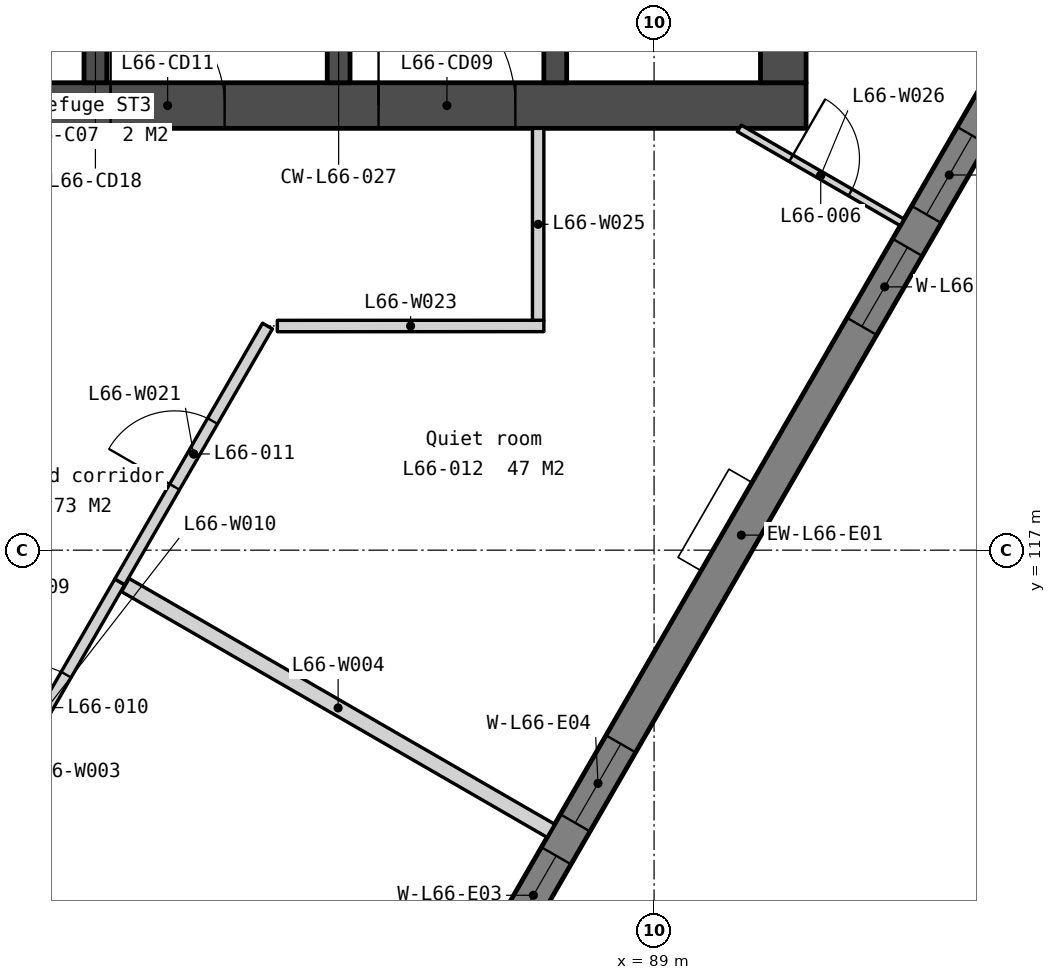
"""IFC4 building model, lengths in metres.
Left out: names, types, materials, properties, quantities, classifications, styles, units other than length and angle.
Written with IfcOpenShell. Run it as: python <this file> out.ifc"""

import sys

from ifc_helpers import new_model, si_unit, direction, frame, frame_2d, origin, place, context, subcontext, project, spatial, polyline, rectangle, outline, extrude, element, fill, save


model = new_model("IFC4")
c1 = context("Model", 3, precision=1e-05, world=origin(), true_north=direction((0.0, 1.0)))
c2 = subcontext(c1, "Body", "Model", "MODEL_VIEW")
j1 = project(units=[si_unit("LENGTHUNIT", "METRE"), si_unit("PLANEANGLEUNIT", "RADIAN")], contexts=[c1])
p1 = place(None, origin())
s1 = spatial("IfcSite", under=j1, at=p1, CompositionType="ELEMENT")
p2 = place(p1, origin())
s2 = spatial("IfcBuilding", under=s1, at=p2, CompositionType="ELEMENT")
p3 = place(p2, frame((0.0, 0.0, 269.9)))
s3 = spatial("IfcBuildingStorey", under=s2, at=p3, CompositionType="ELEMENT", Elevation=269.9)
p4 = place(p3, frame((69.0, 122.85, 0.0), z_axis=(0.0, 0.0, 1.0), x_axis=(1.0, 0.0, 0.0)))
e1 = element("IfcWall", 1, at=p4, inside=s3, PredefinedType="SOLIDWALL", context=c2, shape_type="SweptSolid", body=[
    extrude(rectangle(XDim=22.0, YDim=0.6, at=frame_2d((11.0, 0.0))), origin(), (0.0, 0.0, 1.0), 3.75),
])
p5 = place(p4, frame((16.375, 0.0, 0.0)))
e2 = element("IfcOpeningElement", 2, at=p5, cuts=e1, PredefinedType="OPENING", context=c2, shape_type="SweptSolid", body=[
    extrude(rectangle(XDim=1.8, YDim=2.1, at=frame_2d((0.9, 1.05))), frame((0.0, 0.31, 0.0), z_axis=(0.0, -1.0, 0.0), x_axis=(1.0, 0.0, 0.0)), (0.0, 0.0, 1.0), 0.62),
])
p6 = place(p4, frame((3.825, 0.0, 0.0)))
e3 = element("IfcOpeningElement", 3, at=p6, cuts=e1, PredefinedType="OPENING", context=c2, shape_type="SweptSolid", body=[
    extrude(rectangle(XDim=1.8, YDim=2.1, at=frame_2d((0.9, 1.05))), frame((0.0, 0.31, 0.0), z_axis=(0.0, -1.0, 0.0), x_axis=(1.0, 0.0, 0.0)), (0.0, 0.0, 1.0), 0.62),
])
p7 = place(p4, frame((12.85, 0.0, 0.0)))
e4 = element("IfcOpeningElement", 4, at=p7, cuts=e1, PredefinedType="OPENING", context=c2, shape_type="SweptSolid", body=[
    extrude(rectangle(XDim=1.5, YDim=2.1, at=frame_2d((0.75, 1.05))), frame((0.0, 0.31, 0.0), z_axis=(0.0, -1.0, 0.0), x_axis=(1.0, 0.0, 0.0)), (0.0, 0.0, 1.0), 0.62),
])
p8 = place(p3, frame((81.65, 125.7, 0.0), z_axis=(0.0, 0.0, 1.0), x_axis=(0.0, -1.0, 0.0)))
e5 = element("IfcWall", 5, at=p8, inside=s3, PredefinedType="SOLIDWALL", context=c2, shape_type="SweptSolid", body=[
    extrude(rectangle(XDim=2.55, YDim=0.3, at=frame_2d((1.275, 0.0))), origin(), (0.0, 0.0, 1.0), 3.75),
])
p9 = place(p8, frame((0.75, 0.0, 0.0)))
e6 = element("IfcOpeningElement", 6, at=p9, cuts=e5, PredefinedType="OPENING", context=c2, shape_type="SweptSolid", body=[
    extrude(rectangle(XDim=1.0, YDim=2.1, at=frame_2d((0.5, 1.05))), frame((0.0, 0.16, 0.0), z_axis=(0.0, -1.0, 0.0), x_axis=(1.0, 0.0, 0.0)), (0.0, 0.0, 1.0), 0.32),
])
p10 = place(p3, frame((84.85, 125.85, 0.0), z_axis=(0.0, 0.0, 1.0), x_axis=(0.0, -1.0, 0.0)))
e7 = element("IfcWall", 7, at=p10, inside=s3, PredefinedType="SOLIDWALL", context=c2, shape_type="SweptSolid", body=[
    extrude(rectangle(XDim=2.7, YDim=0.3, at=frame_2d((1.35, 0.0))), origin(), (0.0, 0.0, 1.0), 3.75),
])
p11 = place(p3, frame((87.7, 133.95, 0.0), z_axis=(0.0, 0.0, 1.0), x_axis=(0.0, -1.0, 0.0)))
e8 = element("IfcWall", 8, at=p11, inside=s3, PredefinedType="SOLIDWALL", context=c2, shape_type="SweptSolid", body=[
    extrude(rectangle(XDim=10.8, YDim=0.3, at=frame_2d((5.4, 0.0))), origin(), (0.0, 0.0, 1.0), 3.75),
])
p12 = place(p11, frame((6.95, 0.0, 0.0)))
e9 = element("IfcOpeningElement", 9, at=p12, cuts=e8, PredefinedType="OPENING", context=c2, shape_type="SweptSolid", body=[
    extrude(rectangle(XDim=1.1, YDim=2.1, at=frame_2d((0.55, 1.05))), frame((0.0, 0.16, 0.0), z_axis=(0.0, -1.0, 0.0), x_axis=(1.0, 0.0, 0.0)), (0.0, 0.0, 1.0), 0.32),
])
p13 = place(p11, frame((5.1, 0.0, 0.0)))
e10 = element("IfcOpeningElement", 10, at=p13, cuts=e8, PredefinedType="OPENING", context=c2, shape_type="SweptSolid", body=[
    extrude(rectangle(XDim=1.0, YDim=2.1, at=frame_2d((0.5, 1.05))), frame((0.0, 0.16, 0.0), z_axis=(0.0, -1.0, 0.0), x_axis=(1.0, 0.0, 0.0)), (0.0, 0.0, 1.0), 0.32),
])
p14 = place(p11, frame((9.25, 0.0, 0.0)))
e11 = element("IfcOpeningElement", 11, at=p14, cuts=e8, PredefinedType="OPENING", context=c2, shape_type="SweptSolid", body=[
    extrude(rectangle(XDim=1.1, YDim=2.1, at=frame_2d((0.55, 1.05))), frame((0.0, 0.16, 0.0), z_axis=(0.0, -1.0, 0.0), x_axis=(1.0, 0.0, 0.0)), (0.0, 0.0, 1.0), 0.32),
])
p15 = place(p3, frame((90.7, 133.95, 0.0), z_axis=(0.0, 0.0, 1.0), x_axis=(0.0, -1.0, 0.0)))
e12 = element("IfcWall", 12, at=p15, inside=s3, PredefinedType="SOLIDWALL", context=c2, shape_type="SweptSolid", body=[
    extrude(rectangle(XDim=10.8, YDim=0.6, at=frame_2d((5.4, 0.0))), origin(), (0.0, 0.0, 1.0), 3.75),
])
p16 = place(p3, frame((80.905, 101.188, -0.15), z_axis=(0.0, 0.0, 1.0), x_axis=(0.500002536638, 0.866023939251, 0.0)))
e13 = element("IfcWall", 13, at=p16, inside=s3, PredefinedType="SOLIDWALL", context=c2, shape_type="SweptSolid", body=[
    extrude(outline(polyline([(36.972, 0.0), (36.972, 3.9), (0.0, 3.9), (0.0, 0.0), (36.972, 0.0)])), frame((0.0, 0.225, 0.0), z_axis=(0.0, -1.0, 0.0), x_axis=(1.0, 0.0, 0.0)), (0.0, 0.0, 1.0), 0.45),
])
p17 = place(p16, frame((3.172, 0.0, 0.95)))
e14 = element("IfcOpeningElement", 14, at=p17, cuts=e13, PredefinedType="OPENING", context=c2, shape_type="SweptSolid", body=[
    extrude(rectangle(XDim=1.2, YDim=2.2, at=frame_2d((0.6, 1.1))), frame((0.0, 0.235, 0.0), z_axis=(0.0, -1.0, 0.0), x_axis=(1.0, 0.0, 0.0)), (0.0, 0.0, 1.0), 0.47),
])
p18 = place(p16, frame((4.872, 0.0, 0.95)))
e15 = element("IfcOpeningElement", 15, at=p18, cuts=e13, PredefinedType="OPENING", context=c2, shape_type="SweptSolid", body=[
    extrude(rectangle(XDim=1.2, YDim=2.2, at=frame_2d((0.6, 1.1))), frame((0.0, 0.235, 0.0), z_axis=(0.0, -1.0, 0.0), x_axis=(1.0, 0.0, 0.0)), (0.0, 0.0, 1.0), 0.47),
])
p19 = place(p16, frame((12.415, 0.0, 0.95)))
e16 = element("IfcOpeningElement", 16, at=p19, cuts=e13, PredefinedType="OPENING", context=c2, shape_type="SweptSolid", body=[
    extrude(rectangle(XDim=1.2, YDim=2.2, at=frame_2d((0.6, 1.1))), frame((0.0, 0.235, 0.0), z_axis=(0.0, -1.0, 0.0), x_axis=(1.0, 0.0, 0.0)), (0.0, 0.0, 1.0), 0.47),
])
p20 = place(p16, frame((14.115, 0.0, 0.95)))
e17 = element("IfcOpeningElement", 17, at=p20, cuts=e13, PredefinedType="OPENING", context=c2, shape_type="SweptSolid", body=[
    extrude(rectangle(XDim=1.2, YDim=2.2, at=frame_2d((0.6, 1.1))), frame((0.0, 0.235, 0.0), z_axis=(0.0, -1.0, 0.0), x_axis=(1.0, 0.0, 0.0)), (0.0, 0.0, 1.0), 0.47),
])
p21 = place(p16, frame((21.658, 0.0, 0.95)))
e18 = element("IfcOpeningElement", 18, at=p21, cuts=e13, PredefinedType="OPENING", context=c2, shape_type="SweptSolid", body=[
    extrude(rectangle(XDim=1.2, YDim=2.2, at=frame_2d((0.6, 1.1))), frame((0.0, 0.235, 0.0), z_axis=(0.0, -1.0, 0.0), x_axis=(1.0, 0.0, 0.0)), (0.0, 0.0, 1.0), 0.47),
])
p22 = place(p16, frame((23.358, 0.0, 0.95)))
e19 = element("IfcOpeningElement", 19, at=p22, cuts=e13, PredefinedType="OPENING", context=c2, shape_type="SweptSolid", body=[
    extrude(rectangle(XDim=1.2, YDim=2.2, at=frame_2d((0.6, 1.1))), frame((0.0, 0.235, 0.0), z_axis=(0.0, -1.0, 0.0), x_axis=(1.0, 0.0, 0.0)), (0.0, 0.0, 1.0), 0.47),
])
p23 = place(p16, frame((30.901, 0.0, 0.95)))
e20 = element("IfcOpeningElement", 20, at=p23, cuts=e13, PredefinedType="OPENING", context=c2, shape_type="SweptSolid", body=[
    extrude(rectangle(XDim=1.2, YDim=2.2, at=frame_2d((0.6, 1.1))), frame((0.0, 0.235, 0.0), z_axis=(0.0, -1.0, 0.0), x_axis=(1.0, 0.0, 0.0)), (0.0, 0.0, 1.0), 0.47),
])
p24 = place(p16, frame((32.601, 0.0, 0.95)))
e21 = element("IfcOpeningElement", 21, at=p24, cuts=e13, PredefinedType="OPENING", context=c2, shape_type="SweptSolid", body=[
    extrude(rectangle(XDim=1.2, YDim=2.2, at=frame_2d((0.6, 1.1))), frame((0.0, 0.235, 0.0), z_axis=(0.0, -1.0, 0.0), x_axis=(1.0, 0.0, 0.0)), (0.0, 0.0, 1.0), 0.47),
])
p25 = place(p3, frame((82.044, 116.54, 0.0), z_axis=(0.0, 0.0, 1.0), x_axis=(0.86603151488, -0.499989415123, 0.0)))
e22 = element("IfcWall", 22, at=p25, inside=s3, PredefinedType="PARTITIONING", context=c2, shape_type="SweptSolid", body=[
    extrude(rectangle(XDim=6.465, YDim=0.2, at=frame_2d((3.232, 0.0))), origin(), (0.0, 0.0, 1.0), 3.75),
])
p26 = place(p3, frame((80.06, 113.274, 0.0), z_axis=(0.0, 0.0, 1.0), x_axis=(0.499987977232, 0.866032345022, 0.0)))
e23 = element("IfcWall", 23, at=p26, inside=s3, PredefinedType="PARTITIONING", context=c2, shape_type="SweptSolid", body=[
    extrude(rectangle(XDim=3.82, YDim=0.15, at=frame_2d((1.91, 0.0))), origin(), (0.0, 0.0, 1.0), 3.75),
])
p27 = place(p26, frame((1.41, 0.0, 0.0)))
e24 = element("IfcOpeningElement", 24, at=p27, cuts=e23, PredefinedType="OPENING", context=c2, shape_type="SweptSolid", body=[
    extrude(rectangle(XDim=1.0, YDim=2.1, at=frame_2d((0.5, 1.05))), frame((0.0, 0.085, 0.0), z_axis=(0.0, -1.0, 0.0), x_axis=(1.0, 0.0, 0.0)), (0.0, 0.0, 1.0), 0.17),
])
p28 = place(p3, frame((81.97, 116.583, 0.0), z_axis=(0.0, 0.0, 1.0), x_axis=(0.500003384379, 0.866023449803, 0.0)))
e25 = element("IfcWall", 25, at=p28, inside=s3, PredefinedType="PARTITIONING", context=c2, shape_type="SweptSolid", body=[
    extrude(rectangle(XDim=3.887, YDim=0.15, at=frame_2d((1.943, 0.0))), origin(), (0.0, 0.0, 1.0), 3.75),
])
p29 = place(p28, frame((1.443, 0.0, 0.0)))
e26 = element("IfcOpeningElement", 26, at=p29, cuts=e25, PredefinedType="OPENING", context=c2, shape_type="SweptSolid", body=[
    extrude(rectangle(XDim=1.0, YDim=2.1, at=frame_2d((0.5, 1.05))), frame((0.0, 0.085, 0.0), z_axis=(0.0, -1.0, 0.0), x_axis=(1.0, 0.0, 0.0)), (0.0, 0.0, 1.0), 0.17),
])
p30 = place(p3, frame((84.043, 119.949, 0.0), z_axis=(0.0, 0.0, 1.0), x_axis=(0.999999961215, 0.000278512731, 0.0)))
e27 = element("IfcWall", 27, at=p30, inside=s3, PredefinedType="PARTITIONING", context=c2, shape_type="SweptSolid", body=[
    extrude(rectangle(XDim=3.506, YDim=0.15, at=frame_2d((1.753, 0.0))), origin(), (0.0, 0.0, 1.0), 3.75),
])
p31 = place(p3, frame((87.475, 120.025, 0.0), z_axis=(0.0, 0.0, 1.0), x_axis=(9.6693096e-05, 0.999999995325, 0.0)))
e28 = element("IfcWall", 28, at=p31, inside=s3, PredefinedType="PARTITIONING", context=c2, shape_type="SweptSolid", body=[
    extrude(rectangle(XDim=2.525, YDim=0.15, at=frame_2d((1.262, 0.0))), origin(), (0.0, 0.0, 1.0), 3.75),
])
p32 = place(p3, frame((90.121, 122.55, 0.0), z_axis=(0.0, 0.0, 1.0), x_axis=(0.86604923931, -0.499958713387, 0.0)))
e29 = element("IfcWall", 29, at=p32, inside=s3, PredefinedType="PARTITIONING", context=c2, shape_type="SweptSolid", body=[
    extrude(rectangle(XDim=2.475, YDim=0.1, at=frame_2d((1.237, 0.0))), origin(), (0.0, 0.0, 1.0), 3.75),
])
p33 = place(p32, frame((0.787, 0.0, 0.0)))
e30 = element("IfcOpeningElement", 30, at=p33, cuts=e29, PredefinedType="OPENING", context=c2, shape_type="SweptSolid", body=[
    extrude(rectangle(XDim=0.9, YDim=2.1, at=frame_2d((0.45, 1.05))), frame((0.0, 0.06, 0.0), z_axis=(0.0, -1.0, 0.0), x_axis=(1.0, 0.0, 0.0)), (0.0, 0.0, 1.0), 0.12),
])
p34 = place(p5, origin())
e31 = element("IfcDoor", 31, at=p34, inside=s3, OperationType="DOUBLE_DOOR_DOUBLE_SWING", PredefinedType="DOOR", context=c2, shape_type="SweptSolid", body=[
    extrude(rectangle(XDim=1.8, YDim=2.1, at=frame_2d((0.9, 1.05))), frame((0.0, 0.025, 0.0), z_axis=(0.0, -1.0, 0.0), x_axis=(1.0, 0.0, 0.0)), (0.0, 0.0, 1.0), 0.05),
])
fill(e2, e31)
p35 = place(p7, origin())
e32 = element("IfcDoor", 32, at=p35, inside=s3, OperationType="DOUBLE_DOOR_DOUBLE_SWING", PredefinedType="DOOR", context=c2, shape_type="SweptSolid", body=[
    extrude(rectangle(XDim=1.5, YDim=2.1, at=frame_2d((0.75, 1.05))), frame((0.0, 0.025, 0.0), z_axis=(0.0, -1.0, 0.0), x_axis=(1.0, 0.0, 0.0)), (0.0, 0.0, 1.0), 0.05),
])
fill(e4, e32)
p36 = place(p19, origin())
e33 = element("IfcWindow", 33, at=p36, inside=s3, PartitioningType="SINGLE_PANEL", PredefinedType="WINDOW", context=c2, shape_type="SweptSolid", body=[
    extrude(rectangle(XDim=1.2, YDim=2.2, at=frame_2d((0.6, 1.1))), frame((0.0, 0.03, 0.0), z_axis=(0.0, -1.0, 0.0), x_axis=(1.0, 0.0, 0.0)), (0.0, 0.0, 1.0), 0.06),
])
fill(e16, e33)
p37 = place(p20, origin())
e34 = element("IfcWindow", 34, at=p37, inside=s3, PartitioningType="SINGLE_PANEL", PredefinedType="WINDOW", context=c2, shape_type="SweptSolid", body=[
    extrude(rectangle(XDim=1.2, YDim=2.2, at=frame_2d((0.6, 1.1))), frame((0.0, 0.03, 0.0), z_axis=(0.0, -1.0, 0.0), x_axis=(1.0, 0.0, 0.0)), (0.0, 0.0, 1.0), 0.06),
])
fill(e17, e34)
p38 = place(p21, origin())
e35 = element("IfcWindow", 35, at=p38, inside=s3, PartitioningType="SINGLE_PANEL", PredefinedType="WINDOW", context=c2, shape_type="SweptSolid", body=[
    extrude(rectangle(XDim=1.2, YDim=2.2, at=frame_2d((0.6, 1.1))), frame((0.0, 0.03, 0.0), z_axis=(0.0, -1.0, 0.0), x_axis=(1.0, 0.0, 0.0)), (0.0, 0.0, 1.0), 0.06),
])
fill(e18, e35)
p39 = place(p22, origin())
e36 = element("IfcWindow", 36, at=p39, inside=s3, PartitioningType="SINGLE_PANEL", PredefinedType="WINDOW", context=c2, shape_type="SweptSolid", body=[
    extrude(rectangle(XDim=1.2, YDim=2.2, at=frame_2d((0.6, 1.1))), frame((0.0, 0.03, 0.0), z_axis=(0.0, -1.0, 0.0), x_axis=(1.0, 0.0, 0.0)), (0.0, 0.0, 1.0), 0.06),
])
fill(e19, e36)
p40 = place(p33, origin())
e37 = element("IfcDoor", 37, at=p40, inside=s3, OperationType="SINGLE_SWING_LEFT", PredefinedType="DOOR", context=c2, shape_type="SweptSolid", body=[
    extrude(rectangle(XDim=0.9, YDim=2.1, at=frame_2d((0.45, 1.05))), frame((0.0, 0.025, 0.0), z_axis=(0.0, -1.0, 0.0), x_axis=(1.0, 0.0, 0.0)), (0.0, 0.0, 1.0), 0.05),
])
fill(e30, e37)
p41 = place(p27, origin())
e38 = element("IfcDoor", 38, at=p41, inside=s3, OperationType="SINGLE_SWING_LEFT", PredefinedType="DOOR", context=c2, shape_type="SweptSolid", body=[
    extrude(rectangle(XDim=1.0, YDim=2.1, at=frame_2d((0.5, 1.05))), frame((0.0, 0.025, 0.0), z_axis=(0.0, -1.0, 0.0), x_axis=(1.0, 0.0, 0.0)), (0.0, 0.0, 1.0), 0.05),
])
fill(e24, e38)
p42 = place(p29, origin())
e39 = element("IfcDoor", 39, at=p42, inside=s3, OperationType="SINGLE_SWING_LEFT", PredefinedType="DOOR", context=c2, shape_type="SweptSolid", body=[
    extrude(rectangle(XDim=1.0, YDim=2.1, at=frame_2d((0.5, 1.05))), frame((0.0, 0.025, 0.0), z_axis=(0.0, -1.0, 0.0), x_axis=(1.0, 0.0, 0.0)), (0.0, 0.0, 1.0), 0.05),
])
fill(e26, e39)
save(model, sys.argv[1])
